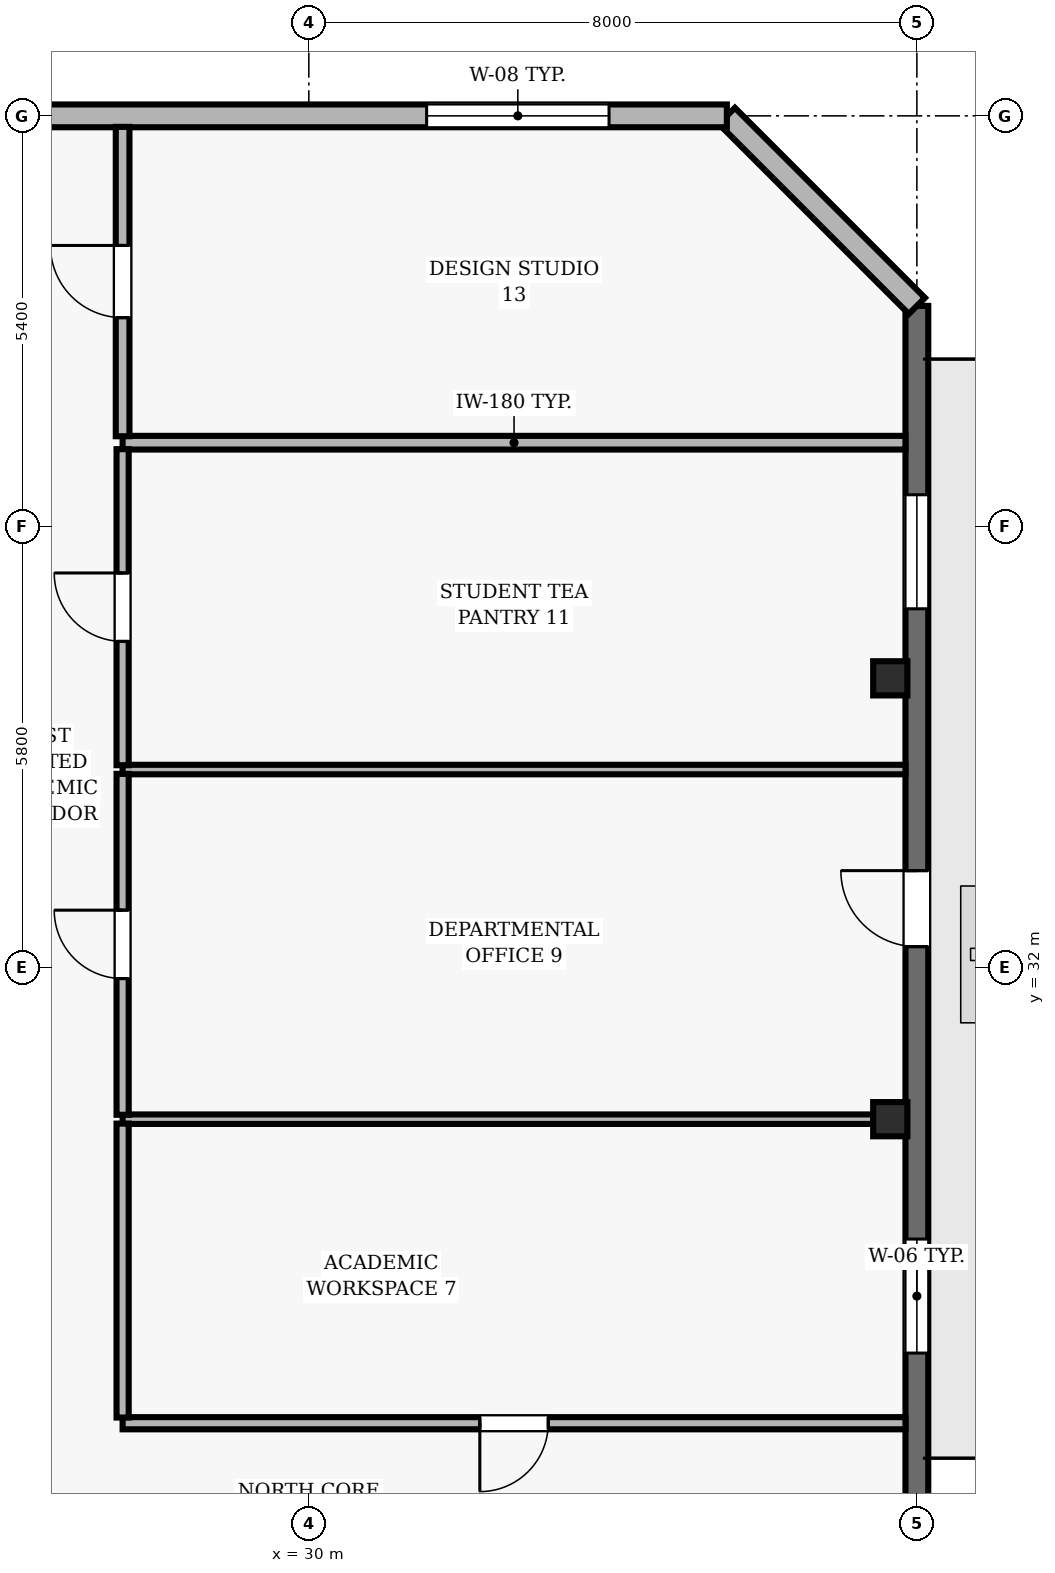
"""IFC4 building model, lengths in metres.
Left out: names, types, materials, properties, quantities, classifications, styles, units other than length and angle.
Written with IfcOpenShell. Run it as: python <this file> out.ifc"""

import sys

from ifc_helpers import new_model, si_unit, direction, frame, frame_2d, origin, origin_2d, place, context, subcontext, project, spatial, rectangle, hollow_rectangle, extrude, element, fill, save


model = new_model("IFC4")
c1 = context("Model", 3, precision=1e-05, world=origin(), true_north=direction((0.0, 1.0)))
c2 = subcontext(c1, "Body", "Model", "MODEL_VIEW")
j1 = project(units=[si_unit("LENGTHUNIT", "METRE"), si_unit("PLANEANGLEUNIT", "RADIAN")], contexts=[c1])
p1 = place(None, origin())
s1 = spatial("IfcSite", under=j1, at=p1, CompositionType="ELEMENT")
p2 = place(p1, origin())
s2 = spatial("IfcBuilding", under=s1, at=p2, CompositionType="ELEMENT")
p3 = place(p2, frame((0.0, 0.0, 187.5)))
s3 = spatial("IfcBuildingStorey", under=s2, at=p3, CompositionType="ELEMENT", Elevation=187.5)
for number, where, z_axis, x_axis in (
    (1, (37.65, 30.0, 0.0), (0.0, 0.0, 1.0), (1.0, 0.0, 0.0)),
    (2, (37.65, 35.8, 0.0), (0.0, 0.0, 1.0), (1.0, 0.0, 0.0)),
):
    element("IfcColumn", number, at=place(p3, frame(where, z_axis=z_axis, x_axis=x_axis)), inside=s3, PredefinedType="COLUMN", context=c2, shape_type="SweptSolid", body=[
        extrude(hollow_rectangle(XDim=0.45, YDim=0.45, WallThickness=0.02, at=origin_2d()), origin(), (0.0, 0.0, 1.0), 3.9),
    ])
p4 = place(p3, frame((38.0, 23.988, 0.0), z_axis=(0.0, 0.0, 1.0), x_axis=(0.0, 1.0, 0.0)))
e3 = element("IfcWall", 3, at=p4, inside=s3, PredefinedType="SOLIDWALL", context=c2, shape_type="SweptSolid", body=[
    extrude(rectangle(XDim=16.712, YDim=0.3, at=frame_2d((8.356, 0.0))), origin(), (0.0, 0.0, 1.0), 3.69),
])
p5 = place(p4, frame((8.282, 0.0, 0.0)))
e4 = element("IfcOpeningElement", 4, at=p5, cuts=e3, PredefinedType="OPENING", context=c2, shape_type="SweptSolid", body=[
    extrude(rectangle(XDim=1.0, YDim=2.2, at=frame_2d((0.5, 1.1))), frame((0.0, 0.16, 0.0), z_axis=(0.0, -1.0, 0.0), x_axis=(1.0, 0.0, 0.0)), (0.0, 0.0, 1.0), 0.32),
])
p6 = place(p4, frame((2.935, 0.0, 0.9)))
e5 = element("IfcOpeningElement", 5, at=p6, cuts=e3, PredefinedType="OPENING", context=c2, shape_type="SweptSolid", body=[
    extrude(rectangle(XDim=1.5, YDim=1.8, at=frame_2d((0.75, 0.9))), frame((0.0, 0.16, 0.0), z_axis=(0.0, -1.0, 0.0), x_axis=(1.0, 0.0, 0.0)), (0.0, 0.0, 1.0), 0.32),
])
p7 = place(p4, frame((12.727, 0.0, 0.9)))
e6 = element("IfcOpeningElement", 6, at=p7, cuts=e3, PredefinedType="OPENING", context=c2, shape_type="SweptSolid", body=[
    extrude(rectangle(XDim=1.5, YDim=1.8, at=frame_2d((0.75, 0.9))), frame((0.0, 0.16, 0.0), z_axis=(0.0, -1.0, 0.0), x_axis=(1.0, 0.0, 0.0)), (0.0, 0.0, 1.0), 0.32),
])
p8 = place(p3, frame((38.0, 40.7, 0.0), z_axis=(0.0, 0.0, 1.0), x_axis=(-0.707106781187, 0.707106781187, 0.0)))
e7 = element("IfcWall", 7, at=p8, inside=s3, PredefinedType="SOLIDWALL", context=c2, shape_type="SweptSolid", body=[
    extrude(rectangle(XDim=3.536, YDim=0.3, at=frame_2d((1.768, 0.0))), origin(), (0.0, 0.0, 1.0), 3.69),
])
p9 = place(p3, frame((35.5, 43.2, 0.0), z_axis=(0.0, 0.0, 1.0), x_axis=(-1.0, 0.0, 0.0)))
e8 = element("IfcWall", 8, at=p9, inside=s3, PredefinedType="SOLIDWALL", context=c2, shape_type="SweptSolid", body=[
    extrude(rectangle(XDim=11.0, YDim=0.3, at=frame_2d((5.5, 0.0))), origin(), (0.0, 0.0, 1.0), 3.69),
])
p10 = place(p9, frame((1.55, 0.0, 0.9)))
e9 = element("IfcOpeningElement", 9, at=p10, cuts=e8, PredefinedType="OPENING", context=c2, shape_type="SweptSolid", body=[
    extrude(rectangle(XDim=2.4, YDim=1.8, at=frame_2d((1.2, 0.9))), frame((0.0, 0.16, 0.0), z_axis=(0.0, -1.0, 0.0), x_axis=(1.0, 0.0, 0.0)), (0.0, 0.0, 1.0), 0.32),
])
p11 = place(p3, frame((37.85, 26.0, 0.0), z_axis=(0.0, 0.0, 1.0), x_axis=(-1.0, 0.0, 0.0)))
e10 = element("IfcWall", 10, at=p11, inside=s3, PredefinedType="PARTITIONING", context=c2, shape_type="SweptSolid", body=[
    extrude(rectangle(XDim=10.3, YDim=0.16, at=frame_2d((5.15, 0.0))), origin(), (0.0, 0.0, 1.0), 3.69),
])
p12 = place(p11, frame((4.7, 0.0, 0.0)))
e11 = element("IfcOpeningElement", 11, at=p12, cuts=e10, PredefinedType="OPENING", context=c2, shape_type="SweptSolid", body=[
    extrude(rectangle(XDim=0.9, YDim=2.1, at=frame_2d((0.45, 1.05))), frame((0.0, 0.09, 0.0), z_axis=(0.0, -1.0, 0.0), x_axis=(1.0, 0.0, 0.0)), (0.0, 0.0, 1.0), 0.18),
])
p13 = place(p3, frame((37.85, 30.0, 0.0), z_axis=(0.0, 0.0, 1.0), x_axis=(-1.0, 0.0, 0.0)))
e12 = element("IfcWall", 12, at=p13, inside=s3, PredefinedType="PARTITIONING", context=c2, shape_type="SweptSolid", body=[
    extrude(rectangle(XDim=10.3, YDim=0.125, at=frame_2d((5.15, 0.0))), origin(), (0.0, 0.0, 1.0), 3.146),
])
p14 = place(p3, frame((37.85, 34.6, 0.0), z_axis=(0.0, 0.0, 1.0), x_axis=(-1.0, 0.0, 0.0)))
e13 = element("IfcWall", 13, at=p14, inside=s3, PredefinedType="PARTITIONING", context=c2, shape_type="SweptSolid", body=[
    extrude(rectangle(XDim=10.3, YDim=0.125, at=frame_2d((5.15, 0.0))), origin(), (0.0, 0.0, 1.0), 3.69),
])
p15 = place(p3, frame((37.85, 38.9, 0.0), z_axis=(0.0, 0.0, 1.0), x_axis=(-1.0, 0.0, 0.0)))
e14 = element("IfcWall", 14, at=p15, inside=s3, PredefinedType="PARTITIONING", context=c2, shape_type="SweptSolid", body=[
    extrude(rectangle(XDim=10.3, YDim=0.18, at=frame_2d((5.15, 0.0))), origin(), (0.0, 0.0, 1.0), 3.69),
])
p16 = place(p3, frame((27.55, 26.075, 0.0), z_axis=(0.0, 0.0, 1.0), x_axis=(0.0, 1.0, 0.0)))
e15 = element("IfcWall", 15, at=p16, inside=s3, PredefinedType="PARTITIONING", context=c2, shape_type="SweptSolid", body=[
    extrude(rectangle(XDim=3.867, YDim=0.16, at=frame_2d((1.934, 0.0))), origin(), (0.0, 0.0, 1.0), 3.69),
])
p17 = place(p3, frame((27.55, 30.058, 0.0), z_axis=(0.0, 0.0, 1.0), x_axis=(0.0, 1.0, 0.0)))
e16 = element("IfcWall", 16, at=p17, inside=s3, PredefinedType="PARTITIONING", context=c2, shape_type="SweptSolid", body=[
    extrude(rectangle(XDim=4.485, YDim=0.16, at=frame_2d((2.242, 0.0))), origin(), (0.0, 0.0, 1.0), 3.69),
])
p18 = place(p17, frame((1.792, 0.0, 0.0)))
e17 = element("IfcOpeningElement", 17, at=p18, cuts=e16, PredefinedType="OPENING", context=c2, shape_type="SweptSolid", body=[
    extrude(rectangle(XDim=0.9, YDim=2.1, at=frame_2d((0.45, 1.05))), frame((0.0, 0.09, 0.0), z_axis=(0.0, -1.0, 0.0), x_axis=(1.0, 0.0, 0.0)), (0.0, 0.0, 1.0), 0.18),
])
p19 = place(p3, frame((27.55, 34.657, 0.0), z_axis=(0.0, 0.0, 1.0), x_axis=(0.0, 1.0, 0.0)))
e18 = element("IfcWall", 18, at=p19, inside=s3, PredefinedType="PARTITIONING", context=c2, shape_type="SweptSolid", body=[
    extrude(rectangle(XDim=4.158, YDim=0.16, at=frame_2d((2.079, 0.0))), origin(), (0.0, 0.0, 1.0), 3.69),
])
p20 = place(p19, frame((1.629, 0.0, 0.0)))
e19 = element("IfcOpeningElement", 19, at=p20, cuts=e18, PredefinedType="OPENING", context=c2, shape_type="SweptSolid", body=[
    extrude(rectangle(XDim=0.9, YDim=2.1, at=frame_2d((0.45, 1.05))), frame((0.0, 0.09, 0.0), z_axis=(0.0, -1.0, 0.0), x_axis=(1.0, 0.0, 0.0)), (0.0, 0.0, 1.0), 0.18),
])
p21 = place(p3, frame((27.55, 38.985, 0.0), z_axis=(0.0, 0.0, 1.0), x_axis=(0.0, 1.0, 0.0)))
e20 = element("IfcWall", 20, at=p21, inside=s3, PredefinedType="PARTITIONING", context=c2, shape_type="SweptSolid", body=[
    extrude(rectangle(XDim=4.07, YDim=0.18, at=frame_2d((2.035, 0.0))), origin(), (0.0, 0.0, 1.0), 3.69),
])
p22 = place(p21, frame((1.56, 0.0, 0.0)))
e21 = element("IfcOpeningElement", 21, at=p22, cuts=e20, PredefinedType="OPENING", context=c2, shape_type="SweptSolid", body=[
    extrude(rectangle(XDim=0.95, YDim=2.1, at=frame_2d((0.475, 1.05))), frame((0.0, 0.1, 0.0), z_axis=(0.0, -1.0, 0.0), x_axis=(1.0, 0.0, 0.0)), (0.0, 0.0, 1.0), 0.2),
])
p23 = place(p5, origin())
e22 = element("IfcDoor", 22, at=p23, inside=s3, OperationType="SINGLE_SWING_RIGHT", PredefinedType="DOOR", context=c2, shape_type="SweptSolid", body=[
    extrude(rectangle(XDim=1.0, YDim=2.2, at=frame_2d((0.5, 1.1))), frame((0.0, 0.025, 0.0), z_axis=(0.0, -1.0, 0.0), x_axis=(1.0, 0.0, 0.0)), (0.0, 0.0, 1.0), 0.05),
])
fill(e4, e22)
p24 = place(p6, origin())
e23 = element("IfcWindow", 23, at=p24, inside=s3, PartitioningType="SINGLE_PANEL", PredefinedType="WINDOW", context=c2, shape_type="SweptSolid", body=[
    extrude(rectangle(XDim=1.5, YDim=1.8, at=frame_2d((0.75, 0.9))), frame((0.0, 0.03, 0.0), z_axis=(0.0, -1.0, 0.0), x_axis=(1.0, 0.0, 0.0)), (0.0, 0.0, 1.0), 0.06),
])
fill(e5, e23)
p25 = place(p7, origin())
e24 = element("IfcWindow", 24, at=p25, inside=s3, PartitioningType="SINGLE_PANEL", PredefinedType="WINDOW", context=c2, shape_type="SweptSolid", body=[
    extrude(rectangle(XDim=1.5, YDim=1.8, at=frame_2d((0.75, 0.9))), frame((0.0, 0.03, 0.0), z_axis=(0.0, -1.0, 0.0), x_axis=(1.0, 0.0, 0.0)), (0.0, 0.0, 1.0), 0.06),
])
fill(e6, e24)
p26 = place(p10, origin())
e25 = element("IfcWindow", 25, at=p26, inside=s3, PartitioningType="SINGLE_PANEL", PredefinedType="WINDOW", context=c2, shape_type="SweptSolid", body=[
    extrude(rectangle(XDim=2.4, YDim=1.8, at=frame_2d((1.2, 0.9))), frame((0.0, 0.03, 0.0), z_axis=(0.0, -1.0, 0.0), x_axis=(1.0, 0.0, 0.0)), (0.0, 0.0, 1.0), 0.06),
])
fill(e9, e25)
p27 = place(p12, origin())
e26 = element("IfcDoor", 26, at=p27, inside=s3, OperationType="SINGLE_SWING_RIGHT", PredefinedType="DOOR", context=c2, shape_type="SweptSolid", body=[
    extrude(rectangle(XDim=0.9, YDim=2.1, at=frame_2d((0.45, 1.05))), frame((0.0, 0.025, 0.0), z_axis=(0.0, -1.0, 0.0), x_axis=(1.0, 0.0, 0.0)), (0.0, 0.0, 1.0), 0.05),
])
fill(e11, e26)
p28 = place(p18, origin())
e27 = element("IfcDoor", 27, at=p28, inside=s3, OperationType="SINGLE_SWING_RIGHT", PredefinedType="DOOR", context=c2, shape_type="SweptSolid", body=[
    extrude(rectangle(XDim=0.9, YDim=2.1, at=frame_2d((0.45, 1.05))), frame((0.0, 0.025, 0.0), z_axis=(0.0, -1.0, 0.0), x_axis=(1.0, 0.0, 0.0)), (0.0, 0.0, 1.0), 0.05),
])
fill(e17, e27)
p29 = place(p20, origin())
e28 = element("IfcDoor", 28, at=p29, inside=s3, OperationType="SINGLE_SWING_RIGHT", PredefinedType="DOOR", context=c2, shape_type="SweptSolid", body=[
    extrude(rectangle(XDim=0.9, YDim=2.1, at=frame_2d((0.45, 1.05))), frame((0.0, 0.025, 0.0), z_axis=(0.0, -1.0, 0.0), x_axis=(1.0, 0.0, 0.0)), (0.0, 0.0, 1.0), 0.05),
])
fill(e19, e28)
p30 = place(p22, origin())
e29 = element("IfcDoor", 29, at=p30, inside=s3, OperationType="SINGLE_SWING_RIGHT", PredefinedType="DOOR", context=c2, shape_type="SweptSolid", body=[
    extrude(rectangle(XDim=0.95, YDim=2.1, at=frame_2d((0.475, 1.05))), frame((0.0, 0.025, 0.0), z_axis=(0.0, -1.0, 0.0), x_axis=(1.0, 0.0, 0.0)), (0.0, 0.0, 1.0), 0.05),
])
fill(e21, e29)
save(model, sys.argv[1])
